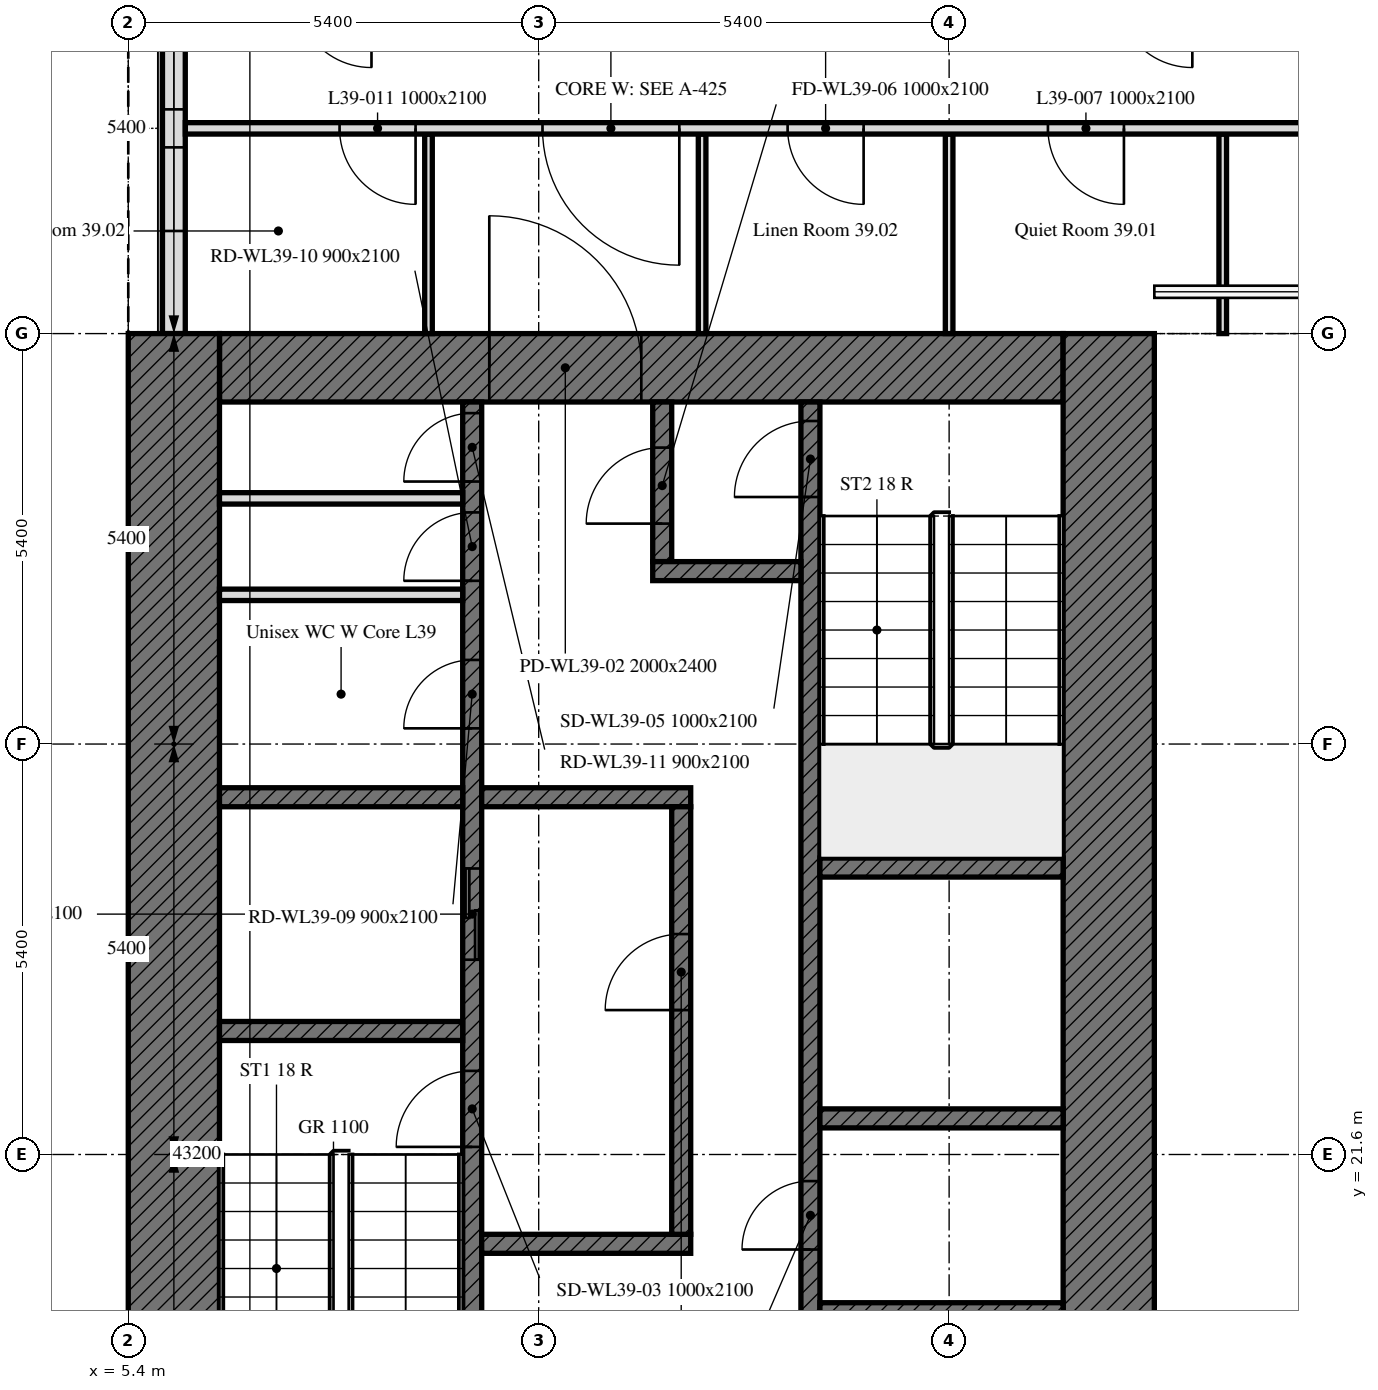
"""IFC4 building model, lengths in metres.
Left out: names, types, materials, properties, quantities, classifications, styles, units other than length and angle.
Written with IfcOpenShell. Run it as: python <this file> out.ifc"""

import sys

from ifc_helpers import new_model, si_unit, direction, frame, frame_2d, origin, place, context, subcontext, project, spatial, rectangle, extrude, element, fill, save


model = new_model("IFC4")
c1 = context("Model", 3, precision=1e-05, world=origin(), true_north=direction((0.0, 1.0)))
c2 = subcontext(c1, "Body", "Model", "MODEL_VIEW")
j1 = project(units=[si_unit("LENGTHUNIT", "METRE"), si_unit("PLANEANGLEUNIT", "RADIAN")], contexts=[c1])
p1 = place(None, origin())
s1 = spatial("IfcSite", under=j1, at=p1, CompositionType="ELEMENT")
p2 = place(p1, origin())
s2 = spatial("IfcBuilding", under=s1, at=p2, CompositionType="ELEMENT")
p3 = place(p2, frame((0.0, 0.0, 166.0)))
s3 = spatial("IfcBuildingStorey", under=s2, at=p3, CompositionType="ELEMENT", Elevation=166.0)
p4 = place(p3, frame((6.0, 37.614, 0.0), z_axis=(0.0, 0.0, 1.0), x_axis=(0.0, -1.0, 0.0)))
e1 = element("IfcWall", 1, at=p4, inside=s3, PredefinedType="SOLIDWALL", context=c2, shape_type="SweptSolid", body=[
    extrude(rectangle(XDim=5.214, YDim=0.3, at=frame_2d((2.607, 0.0))), origin(), (0.0, 0.0, 1.0), 3.0),
])
p5 = place(p4, frame((1.164, 0.0, 0.9)))
e2 = element("IfcOpeningElement", 2, at=p5, cuts=e1, PredefinedType="OPENING", context=c2, shape_type="SweptSolid", body=[
    extrude(rectangle(XDim=1.1, YDim=1.7, at=frame_2d((0.55, 0.85))), frame((0.0, 0.16, 0.0), z_axis=(0.0, -1.0, 0.0), x_axis=(1.0, 0.0, 0.0)), (0.0, 0.0, 1.0), 0.32),
])
p6 = place(p4, frame((2.764, 0.0, 0.9)))
e3 = element("IfcOpeningElement", 3, at=p6, cuts=e1, PredefinedType="OPENING", context=c2, shape_type="SweptSolid", body=[
    extrude(rectangle(XDim=1.1, YDim=1.7, at=frame_2d((0.55, 0.85))), frame((0.0, 0.16, 0.0), z_axis=(0.0, -1.0, 0.0), x_axis=(1.0, 0.0, 0.0)), (0.0, 0.0, 1.0), 0.32),
])
p7 = place(p3, frame((6.6, 31.95, 0.0), z_axis=(0.0, 0.0, 1.0), x_axis=(1.0, 0.0, 0.0)))
e4 = element("IfcWall", 4, at=p7, inside=s3, PredefinedType="SOLIDWALL", context=c2, shape_type="SweptSolid", body=[
    extrude(rectangle(XDim=11.1, YDim=0.9, at=frame_2d((5.55, 0.0))), origin(), (0.0, 0.0, 1.0), 3.0),
])
p8 = place(p7, frame((3.55, 0.0, 0.0)))
e5 = element("IfcOpeningElement", 5, at=p8, cuts=e4, PredefinedType="OPENING", context=c2, shape_type="SweptSolid", body=[
    extrude(rectangle(XDim=2.0, YDim=2.4, at=frame_2d((1.0, 1.2))), frame((0.0, 0.45, 0.0), z_axis=(0.0, -1.0, 0.0), x_axis=(1.0, 0.0, 0.0)), (0.0, 0.0, 1.0), 0.9),
])
for number, where, z_axis, x_axis in (
    (6, (6.0, 16.2, 0.0), (0.0, 0.0, 1.0), (0.0, 1.0, 0.0)),
    (7, (18.3, 32.4, 0.0), (0.0, 0.0, 1.0), (0.0, -1.0, 0.0)),
):
    element("IfcWall", number, at=place(p3, frame(where, z_axis=z_axis, x_axis=x_axis)), inside=s3, PredefinedType="SOLIDWALL", context=c2, shape_type="SweptSolid", body=[
        extrude(rectangle(XDim=16.2, YDim=1.2, at=frame_2d((8.1, 0.0))), origin(), (0.0, 0.0, 1.0), 3.0),
    ])
p9 = place(p3, frame((9.925, 17.1, 0.0), z_axis=(0.0, 0.0, 1.0), x_axis=(0.0, 1.0, 0.0)))
e8 = element("IfcWall", 8, at=p9, inside=s3, PredefinedType="SOLIDWALL", context=c2, shape_type="SweptSolid", body=[
    extrude(rectangle(XDim=14.4, YDim=0.25, at=frame_2d((7.2, 0.0))), origin(), (0.0, 0.0, 1.0), 3.0),
])
p10 = place(p9, frame((4.6, 0.0, 0.0)))
e9 = element("IfcOpeningElement", 9, at=p10, cuts=e8, PredefinedType="OPENING", context=c2, shape_type="SweptSolid", body=[
    extrude(rectangle(XDim=1.0, YDim=2.1, at=frame_2d((0.5, 1.05))), frame((0.0, 0.125, 0.0), z_axis=(0.0, -1.0, 0.0), x_axis=(1.0, 0.0, 0.0)), (0.0, 0.0, 1.0), 0.25),
])
p11 = place(p9, frame((7.062, 0.0, 0.0)))
e10 = element("IfcOpeningElement", 10, at=p11, cuts=e8, PredefinedType="OPENING", context=c2, shape_type="SweptSolid", body=[
    extrude(rectangle(XDim=1.2, YDim=2.1, at=frame_2d((0.6, 1.05))), frame((0.0, 0.125, 0.0), z_axis=(0.0, -1.0, 0.0), x_axis=(1.0, 0.0, 0.0)), (0.0, 0.0, 1.0), 0.25),
])
p12 = place(p9, frame((10.106, 0.0, 0.0)))
e11 = element("IfcOpeningElement", 11, at=p12, cuts=e8, PredefinedType="OPENING", context=c2, shape_type="SweptSolid", body=[
    extrude(rectangle(XDim=0.9, YDim=2.1, at=frame_2d((0.45, 1.05))), frame((0.0, 0.125, 0.0), z_axis=(0.0, -1.0, 0.0), x_axis=(1.0, 0.0, 0.0)), (0.0, 0.0, 1.0), 0.25),
])
p13 = place(p9, frame((12.048, 0.0, 0.0)))
e12 = element("IfcOpeningElement", 12, at=p13, cuts=e8, PredefinedType="OPENING", context=c2, shape_type="SweptSolid", body=[
    extrude(rectangle(XDim=0.9, YDim=2.1, at=frame_2d((0.45, 1.05))), frame((0.0, 0.125, 0.0), z_axis=(0.0, -1.0, 0.0), x_axis=(1.0, 0.0, 0.0)), (0.0, 0.0, 1.0), 0.25),
])
p14 = place(p9, frame((13.354, 0.0, 0.0)))
e13 = element("IfcOpeningElement", 13, at=p14, cuts=e8, PredefinedType="OPENING", context=c2, shape_type="SweptSolid", body=[
    extrude(rectangle(XDim=0.9, YDim=2.1, at=frame_2d((0.45, 1.05))), frame((0.0, 0.125, 0.0), z_axis=(0.0, -1.0, 0.0), x_axis=(1.0, 0.0, 0.0)), (0.0, 0.0, 1.0), 0.25),
])
p15 = place(p3, frame((14.375, 17.1, 0.0), z_axis=(0.0, 0.0, 1.0), x_axis=(0.0, 1.0, 0.0)))
e14 = element("IfcWall", 14, at=p15, inside=s3, PredefinedType="SOLIDWALL", context=c2, shape_type="SweptSolid", body=[
    extrude(rectangle(XDim=14.4, YDim=0.25, at=frame_2d((7.2, 0.0))), origin(), (0.0, 0.0, 1.0), 3.0),
])
p16 = place(p15, frame((13.15, 0.0, 0.0)))
e15 = element("IfcOpeningElement", 15, at=p16, cuts=e14, PredefinedType="OPENING", context=c2, shape_type="SweptSolid", body=[
    extrude(rectangle(XDim=1.0, YDim=2.1, at=frame_2d((0.5, 1.05))), frame((0.0, 0.125, 0.0), z_axis=(0.0, -1.0, 0.0), x_axis=(1.0, 0.0, 0.0)), (0.0, 0.0, 1.0), 0.25),
])
p17 = place(p15, frame((0.6, 0.0, 0.0)))
e16 = element("IfcOpeningElement", 16, at=p17, cuts=e14, PredefinedType="OPENING", context=c2, shape_type="SweptSolid", body=[
    extrude(rectangle(XDim=1.1, YDim=2.1, at=frame_2d((0.55, 1.05))), frame((0.0, 0.125, 0.0), z_axis=(0.0, -1.0, 0.0), x_axis=(1.0, 0.0, 0.0)), (0.0, 0.0, 1.0), 0.25),
])
p18 = place(p15, frame((3.25, 0.0, 0.0)))
e17 = element("IfcOpeningElement", 17, at=p18, cuts=e14, PredefinedType="OPENING", context=c2, shape_type="SweptSolid", body=[
    extrude(rectangle(XDim=0.9, YDim=2.1, at=frame_2d((0.45, 1.05))), frame((0.0, 0.125, 0.0), z_axis=(0.0, -1.0, 0.0), x_axis=(1.0, 0.0, 0.0)), (0.0, 0.0, 1.0), 0.25),
])
for number, where, z_axis, x_axis in (
    (18, (6.6, 23.225, 0.0), (0.0, 0.0, 1.0), (1.0, 0.0, 0.0)),
    (19, (14.5, 25.375, 0.0), (0.0, 0.0, 1.0), (1.0, 0.0, 0.0)),
    (20, (14.5, 22.075, 0.0), (0.0, 0.0, 1.0), (1.0, 0.0, 0.0)),
    (21, (6.6, 26.3, 0.0), (0.0, 0.0, 1.0), (1.0, 0.0, 0.0)),
):
    element("IfcWall", number, at=place(p3, frame(where, z_axis=z_axis, x_axis=x_axis)), inside=s3, PredefinedType="SOLIDWALL", context=c2, shape_type="SweptSolid", body=[
        extrude(rectangle(XDim=3.2, YDim=0.25, at=frame_2d((1.6, 0.0))), origin(), (0.0, 0.0, 1.0), 3.0),
    ])
for number, where, z_axis, x_axis in (
    (22, (10.05, 26.3, 0.0), (0.0, 0.0, 1.0), (1.0, 0.0, 0.0)),
    (23, (10.05, 20.425, 0.0), (0.0, 0.0, 1.0), (1.0, 0.0, 0.0)),
):
    element("IfcWall", number, at=place(p3, frame(where, z_axis=z_axis, x_axis=x_axis)), inside=s3, PredefinedType="SOLIDWALL", context=c2, shape_type="SweptSolid", body=[
        extrude(rectangle(XDim=2.75, YDim=0.25, at=frame_2d((1.375, 0.0))), origin(), (0.0, 0.0, 1.0), 3.0),
    ])
p19 = place(p3, frame((12.425, 29.4, 0.0), z_axis=(0.0, 0.0, 1.0), x_axis=(0.0, 1.0, 0.0)))
e24 = element("IfcWall", 24, at=p19, inside=s3, PredefinedType="SOLIDWALL", context=c2, shape_type="SweptSolid", body=[
    extrude(rectangle(XDim=2.1, YDim=0.25, at=frame_2d((1.05, 0.0))), origin(), (0.0, 0.0, 1.0), 3.0),
])
p20 = place(p19, frame((0.5, 0.0, 0.0)))
e25 = element("IfcOpeningElement", 25, at=p20, cuts=e24, PredefinedType="OPENING", context=c2, shape_type="SweptSolid", body=[
    extrude(rectangle(XDim=1.0, YDim=2.1, at=frame_2d((0.5, 1.05))), frame((0.0, 0.125, 0.0), z_axis=(0.0, -1.0, 0.0), x_axis=(1.0, 0.0, 0.0)), (0.0, 0.0, 1.0), 0.25),
])
p21 = place(p3, frame((12.3, 29.275, 0.0), z_axis=(0.0, 0.0, 1.0), x_axis=(1.0, 0.0, 0.0)))
e26 = element("IfcWall", 26, at=p21, inside=s3, PredefinedType="SOLIDWALL", context=c2, shape_type="SweptSolid", body=[
    extrude(rectangle(XDim=1.95, YDim=0.25, at=frame_2d((0.975, 0.0))), origin(), (0.0, 0.0, 1.0), 3.0),
])
p22 = place(p3, frame((12.675, 20.55, 0.0), z_axis=(0.0, 0.0, 1.0), x_axis=(0.0, 1.0, 0.0)))
e27 = element("IfcWall", 27, at=p22, inside=s3, PredefinedType="SOLIDWALL", context=c2, shape_type="SweptSolid", body=[
    extrude(rectangle(XDim=5.625, YDim=0.25, at=frame_2d((2.812, 0.0))), origin(), (0.0, 0.0, 1.0), 3.0),
])
p23 = place(p22, frame((2.95, 0.0, 0.0)))
e28 = element("IfcOpeningElement", 28, at=p23, cuts=e27, PredefinedType="OPENING", context=c2, shape_type="SweptSolid", body=[
    extrude(rectangle(XDim=1.0, YDim=2.1, at=frame_2d((0.5, 1.05))), frame((0.0, 0.125, 0.0), z_axis=(0.0, -1.0, 0.0), x_axis=(1.0, 0.0, 0.0)), (0.0, 0.0, 1.0), 0.25),
])
p24 = place(p3, frame((14.5, 19.525, 0.0), z_axis=(0.0, 0.0, 1.0), x_axis=(1.0, 0.0, 0.0)))
e29 = element("IfcWall", 29, at=p24, inside=s3, PredefinedType="SOLIDWALL", context=c2, shape_type="SweptSolid", body=[
    extrude(rectangle(XDim=3.2, YDim=0.25, at=frame_2d((1.6, 0.0))), origin(), (0.0, 0.0, 1.0), 3.0),
])
for number, where, z_axis, x_axis in (
    (30, (6.6, 28.963, 0.0), (0.0, 0.0, 1.0), (1.0, 0.0, 0.0)),
    (31, (6.6, 30.232, 0.0), (0.0, 0.0, 1.0), (1.0, 0.0, 0.0)),
):
    element("IfcWall", number, at=place(p3, frame(where, z_axis=z_axis, x_axis=x_axis)), inside=s3, PredefinedType="PARTITIONING", context=c2, shape_type="SweptSolid", body=[
        extrude(rectangle(XDim=3.2, YDim=0.15, at=frame_2d((1.6, 0.0))), origin(), (0.0, 0.0, 1.0), 3.0),
    ])
for number, where, z_axis, x_axis in (
    (32, (16.2, 35.025, 0.0), (0.0, 0.0, 1.0), (0.0, -1.0, 0.0)),
    (33, (19.8, 32.4, 0.0), (0.0, 0.0, 1.0), (0.0, 1.0, 0.0)),
    (34, (9.35, 35.025, 0.0), (0.0, 0.0, 1.0), (0.0, -1.0, 0.0)),
    (35, (12.95, 32.4, 0.0), (0.0, 0.0, 1.0), (0.0, 1.0, 0.0)),
):
    element("IfcWall", number, at=place(p3, frame(where, z_axis=z_axis, x_axis=x_axis)), inside=s3, PredefinedType="PARTITIONING", context=c2, shape_type="SweptSolid", body=[
        extrude(rectangle(XDim=2.625, YDim=0.1, at=frame_2d((1.312, 0.0))), origin(), (0.0, 0.0, 1.0), 3.0),
    ])
p25 = place(p3, frame((43.275, 35.1, 0.0), z_axis=(0.0, 0.0, 1.0), x_axis=(-1.0, 0.0, 0.0)))
e36 = element("IfcWall", 36, at=p25, inside=s3, PredefinedType="PARTITIONING", context=c2, shape_type="SweptSolid", body=[
    extrude(rectangle(XDim=37.124, YDim=0.15, at=frame_2d((18.562, 0.0))), origin(), (0.0, 0.0, 1.0), 3.0),
])
p26 = place(p25, frame((24.775, 0.0, 0.0)))
e37 = element("IfcOpeningElement", 37, at=p26, cuts=e36, PredefinedType="OPENING", context=c2, shape_type="SweptSolid", body=[
    extrude(rectangle(XDim=1.0, YDim=2.1, at=frame_2d((0.5, 1.05))), frame((0.0, 0.075, 0.0), z_axis=(0.0, -1.0, 0.0), x_axis=(1.0, 0.0, 0.0)), (0.0, 0.0, 1.0), 0.15),
])
p27 = place(p25, frame((18.475, 0.0, 0.0)))
e38 = element("IfcOpeningElement", 38, at=p27, cuts=e36, PredefinedType="OPENING", context=c2, shape_type="SweptSolid", body=[
    extrude(rectangle(XDim=1.0, YDim=2.1, at=frame_2d((0.5, 1.05))), frame((0.0, 0.075, 0.0), z_axis=(0.0, -1.0, 0.0), x_axis=(1.0, 0.0, 0.0)), (0.0, 0.0, 1.0), 0.15),
])
p28 = place(p25, frame((13.525, 0.0, 0.0)))
e39 = element("IfcOpeningElement", 39, at=p28, cuts=e36, PredefinedType="OPENING", context=c2, shape_type="SweptSolid", body=[
    extrude(rectangle(XDim=1.0, YDim=2.1, at=frame_2d((0.5, 1.05))), frame((0.0, 0.075, 0.0), z_axis=(0.0, -1.0, 0.0), x_axis=(1.0, 0.0, 0.0)), (0.0, 0.0, 1.0), 0.15),
])
p29 = place(p25, frame((34.095, 0.0, 0.0)))
e40 = element("IfcOpeningElement", 40, at=p29, cuts=e36, PredefinedType="OPENING", context=c2, shape_type="SweptSolid", body=[
    extrude(rectangle(XDim=1.0, YDim=2.1, at=frame_2d((0.5, 1.05))), frame((0.0, 0.075, 0.0), z_axis=(0.0, -1.0, 0.0), x_axis=(1.0, 0.0, 0.0)), (0.0, 0.0, 1.0), 0.15),
])
p30 = place(p25, frame((8.75, 0.0, 0.0)))
e41 = element("IfcOpeningElement", 41, at=p30, cuts=e36, PredefinedType="OPENING", context=c2, shape_type="SweptSolid", body=[
    extrude(rectangle(XDim=1.0, YDim=2.1, at=frame_2d((0.5, 1.05))), frame((0.0, 0.075, 0.0), z_axis=(0.0, -1.0, 0.0), x_axis=(1.0, 0.0, 0.0)), (0.0, 0.0, 1.0), 0.15),
])
p31 = place(p25, frame((1.55, 0.0, 0.0)))
e42 = element("IfcOpeningElement", 42, at=p31, cuts=e36, PredefinedType="OPENING", context=c2, shape_type="SweptSolid", body=[
    extrude(rectangle(XDim=1.0, YDim=2.1, at=frame_2d((0.5, 1.05))), frame((0.0, 0.075, 0.0), z_axis=(0.0, -1.0, 0.0), x_axis=(1.0, 0.0, 0.0)), (0.0, 0.0, 1.0), 0.15),
])
p32 = place(p25, frame((28.2, 0.0, 0.0)))
e43 = element("IfcOpeningElement", 43, at=p32, cuts=e36, PredefinedType="OPENING", context=c2, shape_type="SweptSolid", body=[
    extrude(rectangle(XDim=1.0, YDim=2.1, at=frame_2d((0.5, 1.05))), frame((0.0, 0.075, 0.0), z_axis=(0.0, -1.0, 0.0), x_axis=(1.0, 0.0, 0.0)), (0.0, 0.0, 1.0), 0.15),
])
p33 = place(p25, frame((30.625, 0.0, 0.0)))
e44 = element("IfcOpeningElement", 44, at=p33, cuts=e36, PredefinedType="OPENING", context=c2, shape_type="SweptSolid", body=[
    extrude(rectangle(XDim=1.8, YDim=2.4, at=frame_2d((0.9, 1.2))), frame((0.0, 0.075, 0.0), z_axis=(0.0, -1.0, 0.0), x_axis=(1.0, 0.0, 0.0)), (0.0, 0.0, 1.0), 0.15),
])
p34 = place(p25, frame((5.525, 0.0, 0.0)))
e45 = element("IfcOpeningElement", 45, at=p34, cuts=e36, PredefinedType="OPENING", context=c2, shape_type="SweptSolid", body=[
    extrude(rectangle(XDim=1.8, YDim=2.4, at=frame_2d((0.9, 1.2))), frame((0.0, 0.075, 0.0), z_axis=(0.0, -1.0, 0.0), x_axis=(1.0, 0.0, 0.0)), (0.0, 0.0, 1.0), 0.15),
])
p35 = place(p5, origin())
e46 = element("IfcWindow", 46, at=p35, inside=s3, PartitioningType="SINGLE_PANEL", PredefinedType="WINDOW", context=c2, shape_type="SweptSolid", body=[
    extrude(rectangle(XDim=1.1, YDim=1.7, at=frame_2d((0.55, 0.85))), frame((0.0, 0.03, 0.0), z_axis=(0.0, -1.0, 0.0), x_axis=(1.0, 0.0, 0.0)), (0.0, 0.0, 1.0), 0.06),
])
fill(e2, e46)
p36 = place(p6, origin())
e47 = element("IfcWindow", 47, at=p36, inside=s3, PartitioningType="SINGLE_PANEL", PredefinedType="WINDOW", context=c2, shape_type="SweptSolid", body=[
    extrude(rectangle(XDim=1.1, YDim=1.7, at=frame_2d((0.55, 0.85))), frame((0.0, 0.03, 0.0), z_axis=(0.0, -1.0, 0.0), x_axis=(1.0, 0.0, 0.0)), (0.0, 0.0, 1.0), 0.06),
])
fill(e3, e47)
p37 = place(p8, origin())
e48 = element("IfcDoor", 48, at=p37, inside=s3, OperationType="DOUBLE_DOOR_SINGLE_SWING", PredefinedType="DOOR", context=c2, shape_type="SweptSolid", body=[
    extrude(rectangle(XDim=2.0, YDim=2.4, at=frame_2d((1.0, 1.2))), frame((0.0, 0.025, 0.0), z_axis=(0.0, -1.0, 0.0), x_axis=(1.0, 0.0, 0.0)), (0.0, 0.0, 1.0), 0.05),
])
fill(e5, e48)
p38 = place(p10, origin())
e49 = element("IfcDoor", 49, at=p38, inside=s3, OperationType="SINGLE_SWING_LEFT", PredefinedType="DOOR", context=c2, shape_type="SweptSolid", body=[
    extrude(rectangle(XDim=1.0, YDim=2.1, at=frame_2d((0.5, 1.05))), frame((0.0, 0.025, 0.0), z_axis=(0.0, -1.0, 0.0), x_axis=(1.0, 0.0, 0.0)), (0.0, 0.0, 1.0), 0.05),
])
fill(e9, e49)
p39 = place(p23, origin())
e50 = element("IfcDoor", 50, at=p39, inside=s3, OperationType="SINGLE_SWING_LEFT", PredefinedType="DOOR", context=c2, shape_type="SweptSolid", body=[
    extrude(rectangle(XDim=1.0, YDim=2.1, at=frame_2d((0.5, 1.05))), frame((0.0, 0.025, 0.0), z_axis=(0.0, -1.0, 0.0), x_axis=(1.0, 0.0, 0.0)), (0.0, 0.0, 1.0), 0.05),
])
fill(e28, e50)
p40 = place(p16, origin())
e51 = element("IfcDoor", 51, at=p40, inside=s3, OperationType="SINGLE_SWING_LEFT", PredefinedType="DOOR", context=c2, shape_type="SweptSolid", body=[
    extrude(rectangle(XDim=1.0, YDim=2.1, at=frame_2d((0.5, 1.05))), frame((0.0, 0.025, 0.0), z_axis=(0.0, -1.0, 0.0), x_axis=(1.0, 0.0, 0.0)), (0.0, 0.0, 1.0), 0.05),
])
fill(e15, e51)
p41 = place(p20, origin())
e52 = element("IfcDoor", 52, at=p41, inside=s3, OperationType="SINGLE_SWING_LEFT", PredefinedType="DOOR", context=c2, shape_type="SweptSolid", body=[
    extrude(rectangle(XDim=1.0, YDim=2.1, at=frame_2d((0.5, 1.05))), frame((0.0, 0.025, 0.0), z_axis=(0.0, -1.0, 0.0), x_axis=(1.0, 0.0, 0.0)), (0.0, 0.0, 1.0), 0.05),
])
fill(e25, e52)
p42 = place(p11, origin())
e53 = element("IfcDoor", 53, at=p42, inside=s3, OperationType="DOUBLE_DOOR_SLIDING", PredefinedType="DOOR", context=c2, shape_type="SweptSolid", body=[
    extrude(rectangle(XDim=1.2, YDim=2.1, at=frame_2d((0.6, 1.05))), frame((0.0, 0.025, 0.0), z_axis=(0.0, -1.0, 0.0), x_axis=(1.0, 0.0, 0.0)), (0.0, 0.0, 1.0), 0.05),
])
fill(e10, e53)
p43 = place(p12, origin())
e54 = element("IfcDoor", 54, at=p43, inside=s3, OperationType="SINGLE_SWING_LEFT", PredefinedType="DOOR", context=c2, shape_type="SweptSolid", body=[
    extrude(rectangle(XDim=0.9, YDim=2.1, at=frame_2d((0.45, 1.05))), frame((0.0, 0.025, 0.0), z_axis=(0.0, -1.0, 0.0), x_axis=(1.0, 0.0, 0.0)), (0.0, 0.0, 1.0), 0.05),
])
fill(e11, e54)
p44 = place(p13, origin())
e55 = element("IfcDoor", 55, at=p44, inside=s3, OperationType="SINGLE_SWING_LEFT", PredefinedType="DOOR", context=c2, shape_type="SweptSolid", body=[
    extrude(rectangle(XDim=0.9, YDim=2.1, at=frame_2d((0.45, 1.05))), frame((0.0, 0.025, 0.0), z_axis=(0.0, -1.0, 0.0), x_axis=(1.0, 0.0, 0.0)), (0.0, 0.0, 1.0), 0.05),
])
fill(e12, e55)
p45 = place(p14, origin())
e56 = element("IfcDoor", 56, at=p45, inside=s3, OperationType="SINGLE_SWING_LEFT", PredefinedType="DOOR", context=c2, shape_type="SweptSolid", body=[
    extrude(rectangle(XDim=0.9, YDim=2.1, at=frame_2d((0.45, 1.05))), frame((0.0, 0.025, 0.0), z_axis=(0.0, -1.0, 0.0), x_axis=(1.0, 0.0, 0.0)), (0.0, 0.0, 1.0), 0.05),
])
fill(e13, e56)
p46 = place(p18, origin())
e57 = element("IfcDoor", 57, at=p46, inside=s3, OperationType="SINGLE_SWING_LEFT", PredefinedType="DOOR", context=c2, shape_type="SweptSolid", body=[
    extrude(rectangle(XDim=0.9, YDim=2.1, at=frame_2d((0.45, 1.05))), frame((0.0, 0.025, 0.0), z_axis=(0.0, -1.0, 0.0), x_axis=(1.0, 0.0, 0.0)), (0.0, 0.0, 1.0), 0.05),
])
fill(e17, e57)
p47 = place(p26, origin())
e58 = element("IfcDoor", 58, at=p47, inside=s3, OperationType="SINGLE_SWING_LEFT", PredefinedType="DOOR", context=c2, shape_type="SweptSolid", body=[
    extrude(rectangle(XDim=1.0, YDim=2.1, at=frame_2d((0.5, 1.05))), frame((0.0, 0.025, 0.0), z_axis=(0.0, -1.0, 0.0), x_axis=(1.0, 0.0, 0.0)), (0.0, 0.0, 1.0), 0.05),
])
fill(e37, e58)
p48 = place(p29, origin())
e59 = element("IfcDoor", 59, at=p48, inside=s3, OperationType="SINGLE_SWING_RIGHT", PredefinedType="DOOR", context=c2, shape_type="SweptSolid", body=[
    extrude(rectangle(XDim=1.0, YDim=2.1, at=frame_2d((0.5, 1.05))), frame((0.0, 0.025, 0.0), z_axis=(0.0, -1.0, 0.0), x_axis=(1.0, 0.0, 0.0)), (0.0, 0.0, 1.0), 0.05),
])
fill(e40, e59)
p49 = place(p32, origin())
e60 = element("IfcDoor", 60, at=p49, inside=s3, OperationType="SINGLE_SWING_LEFT", PredefinedType="DOOR", context=c2, shape_type="SweptSolid", body=[
    extrude(rectangle(XDim=1.0, YDim=2.1, at=frame_2d((0.5, 1.05))), frame((0.0, 0.025, 0.0), z_axis=(0.0, -1.0, 0.0), x_axis=(1.0, 0.0, 0.0)), (0.0, 0.0, 1.0), 0.05),
])
fill(e43, e60)
p50 = place(p33, origin())
e61 = element("IfcDoor", 61, at=p50, inside=s3, OperationType="DOUBLE_DOOR_SINGLE_SWING", PredefinedType="DOOR", context=c2, shape_type="SweptSolid", body=[
    extrude(rectangle(XDim=1.8, YDim=2.4, at=frame_2d((0.9, 1.2))), frame((0.0, 0.025, 0.0), z_axis=(0.0, -1.0, 0.0), x_axis=(1.0, 0.0, 0.0)), (0.0, 0.0, 1.0), 0.05),
])
fill(e44, e61)
save(model, sys.argv[1])
